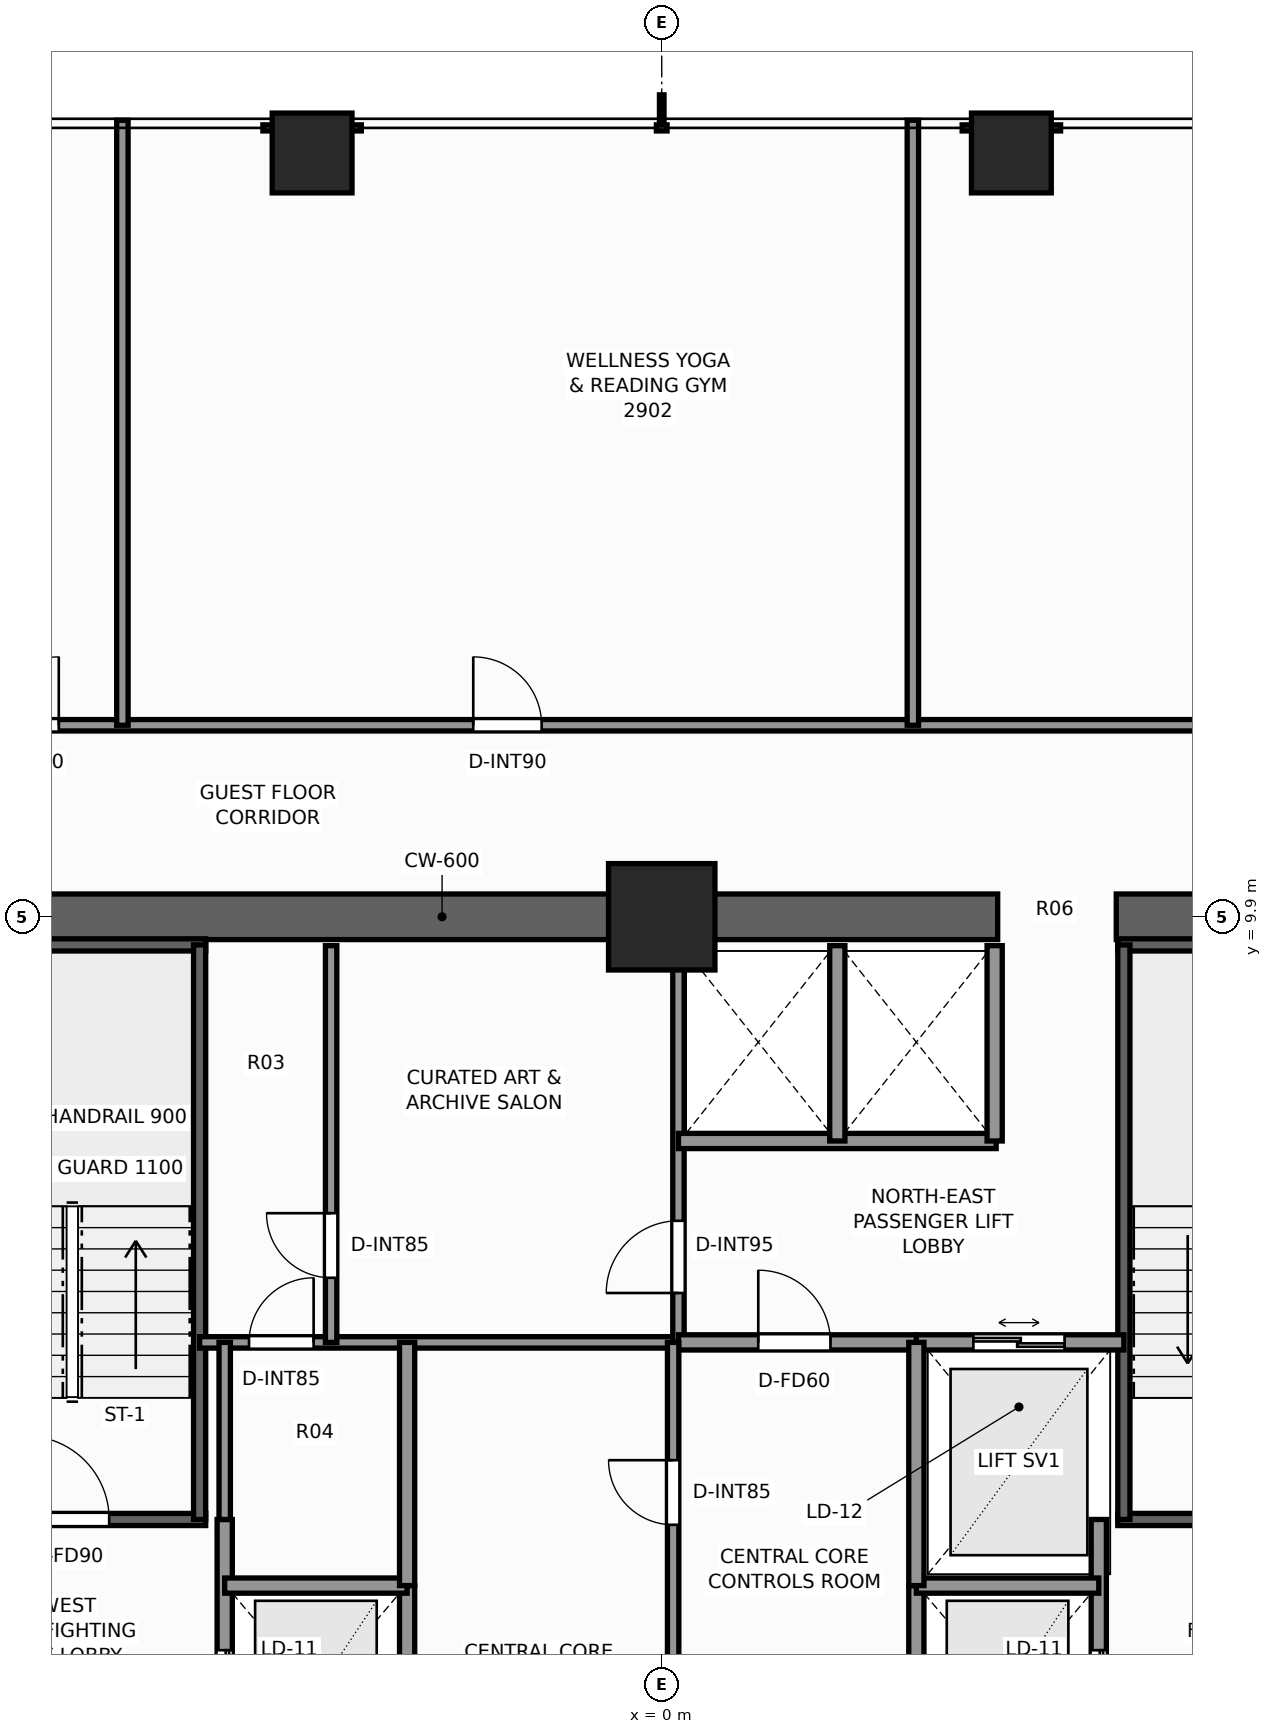
"""IFC4 building model, lengths in metres.
Left out: names, types, materials, properties, quantities, classifications, styles, units other than length and angle.
Written with IfcOpenShell. Run it as: python <this file> out.ifc"""

import sys

from ifc_helpers import new_model, si_unit, direction, frame, frame_2d, origin, origin_2d, place, context, subcontext, project, spatial, rectangle, extrude, element, fill, save


model = new_model("IFC4")
c1 = context("Model", 3, precision=1e-05, world=origin(), true_north=direction((0.0, 1.0)))
c2 = subcontext(c1, "Body", "Model", "MODEL_VIEW")
j1 = project(units=[si_unit("LENGTHUNIT", "METRE"), si_unit("PLANEANGLEUNIT", "RADIAN")], contexts=[c1])
p1 = place(None, origin())
s1 = spatial("IfcSite", under=j1, at=p1, CompositionType="ELEMENT")
p2 = place(p1, origin())
s2 = spatial("IfcBuilding", under=s1, at=p2, CompositionType="ELEMENT")
p3 = place(p2, frame((0.0, 0.0, 101.9)))
s3 = spatial("IfcBuildingStorey", under=s2, at=p3, CompositionType="ELEMENT", Elevation=101.9)
p4 = place(p3, frame((-10.2, 9.9, 0.0), z_axis=(0.0, 0.0, 1.0), x_axis=(1.0, 0.0, 0.0)))
e1 = element("IfcWall", 1, at=p4, inside=s3, PredefinedType="SHEAR", context=c2, shape_type="SweptSolid", body=[
    extrude(rectangle(XDim=14.62, YDim=0.6, at=frame_2d((7.31, 0.0))), origin(), (0.0, 0.0, 1.0), 3.3),
])
p5 = place(p3, frame((5.98, 9.9, 0.0), z_axis=(0.0, 0.0, 1.0), x_axis=(1.0, 0.0, 0.0)))
e2 = element("IfcWall", 2, at=p5, inside=s3, PredefinedType="SHEAR", context=c2, shape_type="SweptSolid", body=[
    extrude(rectangle(XDim=4.22, YDim=0.6, at=frame_2d((2.11, 0.0))), origin(), (0.0, 0.0, 1.0), 3.3),
])
p6 = place(p3, frame((0.0, 9.9, 0.0), z_axis=(0.0, 0.0, 1.0), x_axis=(1.0, 0.0, 0.0)))
e3 = element("IfcColumn", 3, at=p6, inside=s3, PredefinedType="COLUMN", context=c2, shape_type="SweptSolid", body=[
    extrude(rectangle(XDim=1.4, YDim=1.4, at=origin_2d()), origin(), (0.0, 0.0, 1.0), 3.3),
])
for number, where, z_axis, x_axis in (
    (4, (-4.6, 19.95, 0.0), (0.0, 0.0, 1.0), (1.0, 0.0, 0.0)),
    (5, (4.6, 19.95, 0.0), (0.0, 0.0, 1.0), (1.0, 0.0, 0.0)),
):
    element("IfcColumn", number, at=place(p3, frame(where, z_axis=z_axis, x_axis=x_axis)), inside=s3, PredefinedType="COLUMN", context=c2, shape_type="SweptSolid", body=[
        extrude(rectangle(XDim=1.05, YDim=1.05, at=origin_2d()), origin(), (0.0, 0.0, 1.0), 3.3),
    ])
p7 = place(p3, frame((-9.52, 1.97, 0.0), z_axis=(0.0, 0.0, 1.0), x_axis=(1.0, 0.0, 0.0)))
e6 = element("IfcWall", 6, at=p7, inside=s3, PredefinedType="SHEAR", context=c2, shape_type="SweptSolid", body=[
    extrude(rectangle(XDim=3.52, YDim=0.16, at=frame_2d((1.76, 0.0))), origin(), (0.0, 0.0, 1.0), 3.3),
])
p8 = place(p7, frame((1.15, 0.0, 0.0)))
e7 = element("IfcOpeningElement", 7, at=p8, cuts=e6, PredefinedType="OPENING", context=c2, shape_type="SweptSolid", body=[
    extrude(rectangle(XDim=1.1, YDim=2.2, at=frame_2d((0.55, 1.1))), frame((0.0, 0.09, 0.0), z_axis=(0.0, -1.0, 0.0), x_axis=(1.0, 0.0, 0.0)), (0.0, 0.0, 1.0), 0.18),
])
p9 = place(p3, frame((-9.52, 9.53, 0.0), z_axis=(0.0, 0.0, 1.0), x_axis=(1.0, 0.0, 0.0)))
e8 = element("IfcWall", 8, at=p9, inside=s3, PredefinedType="SHEAR", context=c2, shape_type="SweptSolid", body=[
    extrude(rectangle(XDim=3.52, YDim=0.16, at=frame_2d((1.76, 0.0))), origin(), (0.0, 0.0, 1.0), 3.3),
])
p10 = place(p3, frame((-6.08, 1.97, 0.0), z_axis=(0.0, 0.0, 1.0), x_axis=(0.0, 1.0, 0.0)))
e9 = element("IfcWall", 9, at=p10, inside=s3, PredefinedType="SHEAR", context=c2, shape_type="SweptSolid", body=[
    extrude(rectangle(XDim=7.56, YDim=0.16, at=frame_2d((3.78, 0.0))), origin(), (0.0, 0.0, 1.0), 3.3),
])
p11 = place(p3, frame((6.0, 1.97, 0.0), z_axis=(0.0, 0.0, 1.0), x_axis=(1.0, 0.0, 0.0)))
e10 = element("IfcWall", 10, at=p11, inside=s3, PredefinedType="SHEAR", context=c2, shape_type="SweptSolid", body=[
    extrude(rectangle(XDim=3.52, YDim=0.16, at=frame_2d((1.76, 0.0))), origin(), (0.0, 0.0, 1.0), 3.3),
])
p12 = place(p11, frame((1.15, 0.0, 0.0)))
e11 = element("IfcOpeningElement", 11, at=p12, cuts=e10, PredefinedType="OPENING", context=c2, shape_type="SweptSolid", body=[
    extrude(rectangle(XDim=1.1, YDim=2.2, at=frame_2d((0.55, 1.1))), frame((0.0, 0.09, 0.0), z_axis=(0.0, -1.0, 0.0), x_axis=(1.0, 0.0, 0.0)), (0.0, 0.0, 1.0), 0.18),
])
p13 = place(p3, frame((6.0, 9.53, 0.0), z_axis=(0.0, 0.0, 1.0), x_axis=(1.0, 0.0, 0.0)))
e12 = element("IfcWall", 12, at=p13, inside=s3, PredefinedType="SHEAR", context=c2, shape_type="SweptSolid", body=[
    extrude(rectangle(XDim=3.52, YDim=0.16, at=frame_2d((1.76, 0.0))), origin(), (0.0, 0.0, 1.0), 3.3),
])
p14 = place(p3, frame((6.08, 1.97, 0.0), z_axis=(0.0, 0.0, 1.0), x_axis=(0.0, 1.0, 0.0)))
e13 = element("IfcWall", 13, at=p14, inside=s3, PredefinedType="SHEAR", context=c2, shape_type="SweptSolid", body=[
    extrude(rectangle(XDim=7.56, YDim=0.16, at=frame_2d((3.78, 0.0))), origin(), (0.0, 0.0, 1.0), 3.3),
])
p15 = place(p3, frame((-5.75, -3.6, 0.0), z_axis=(0.0, 0.0, 1.0), x_axis=(0.0, 1.0, 0.0)))
e14 = element("IfcWall", 14, at=p15, inside=s3, PredefinedType="SOLIDWALL", context=c2, shape_type="SweptSolid", body=[
    extrude(rectangle(XDim=5.57, YDim=0.2, at=frame_2d((2.785, 0.0))), origin(), (0.0, 0.0, 1.0), 3.08),
])
p16 = place(p15, frame((2.75, 0.0, 0.0)))
e15 = element("IfcOpeningElement", 15, at=p16, cuts=e14, PredefinedType="OPENING", context=c2, shape_type="SweptSolid", body=[
    extrude(rectangle(XDim=1.1, YDim=2.2, at=frame_2d((0.55, 1.1))), frame((0.0, 0.11, 0.0), z_axis=(0.0, -1.0, 0.0), x_axis=(1.0, 0.0, 0.0)), (0.0, 0.0, 1.0), 0.22),
])
p17 = place(p3, frame((-3.35, -1.7, 0.0), z_axis=(0.0, 0.0, 1.0), x_axis=(0.0, 1.0, 0.0)))
e16 = element("IfcWall", 16, at=p17, inside=s3, PredefinedType="SOLIDWALL", context=c2, shape_type="SweptSolid", body=[
    extrude(rectangle(XDim=2.8, YDim=0.2, at=frame_2d((1.4, 0.0))), origin(), (0.0, 0.0, 1.0), 3.08),
])
p18 = place(p3, frame((-5.75, 1.1, 0.0), z_axis=(0.0, 0.0, 1.0), x_axis=(1.0, 0.0, 0.0)))
e17 = element("IfcWall", 17, at=p18, inside=s3, PredefinedType="SOLIDWALL", context=c2, shape_type="SweptSolid", body=[
    extrude(rectangle(XDim=2.4, YDim=0.2, at=frame_2d((1.2, 0.0))), origin(), (0.0, 0.0, 1.0), 3.08),
])
p19 = place(p3, frame((5.75, -3.6, 0.0), z_axis=(0.0, 0.0, 1.0), x_axis=(0.0, 1.0, 0.0)))
e18 = element("IfcWall", 18, at=p19, inside=s3, PredefinedType="SOLIDWALL", context=c2, shape_type="SweptSolid", body=[
    extrude(rectangle(XDim=5.57, YDim=0.2, at=frame_2d((2.785, 0.0))), origin(), (0.0, 0.0, 1.0), 3.08),
])
p20 = place(p19, frame((2.75, 0.0, 0.0)))
e19 = element("IfcOpeningElement", 19, at=p20, cuts=e18, PredefinedType="OPENING", context=c2, shape_type="SweptSolid", body=[
    extrude(rectangle(XDim=1.1, YDim=2.2, at=frame_2d((0.55, 1.1))), frame((0.0, 0.11, 0.0), z_axis=(0.0, -1.0, 0.0), x_axis=(1.0, 0.0, 0.0)), (0.0, 0.0, 1.0), 0.22),
])
p21 = place(p3, frame((3.35, -1.7, 0.0), z_axis=(0.0, 0.0, 1.0), x_axis=(0.0, 1.0, 0.0)))
e20 = element("IfcWall", 20, at=p21, inside=s3, PredefinedType="SOLIDWALL", context=c2, shape_type="SweptSolid", body=[
    extrude(rectangle(XDim=2.8, YDim=0.2, at=frame_2d((1.4, 0.0))), origin(), (0.0, 0.0, 1.0), 3.08),
])
p22 = place(p3, frame((3.35, 1.1, 0.0), z_axis=(0.0, 0.0, 1.0), x_axis=(1.0, 0.0, 0.0)))
e21 = element("IfcWall", 21, at=p22, inside=s3, PredefinedType="SOLIDWALL", context=c2, shape_type="SweptSolid", body=[
    extrude(rectangle(XDim=2.4, YDim=0.2, at=frame_2d((1.2, 0.0))), origin(), (0.0, 0.0, 1.0), 3.08),
])
p23 = place(p3, frame((3.35, 4.3, 0.0), z_axis=(0.0, 0.0, 1.0), x_axis=(1.0, 0.0, 0.0)))
e22 = element("IfcWall", 22, at=p23, inside=s3, PredefinedType="SOLIDWALL", context=c2, shape_type="SweptSolid", body=[
    extrude(rectangle(XDim=2.73, YDim=0.2, at=frame_2d((1.365, 0.0))), origin(), (0.0, 0.0, 1.0), 3.08),
])
p24 = place(p23, frame((0.75, 0.0, 0.0)))
e23 = element("IfcOpeningElement", 23, at=p24, cuts=e22, PredefinedType="OPENING", context=c2, shape_type="SweptSolid", body=[
    extrude(rectangle(XDim=1.2, YDim=2.25, at=frame_2d((0.6, 1.125))), frame((0.0, 0.11, 0.0), z_axis=(0.0, -1.0, 0.0), x_axis=(1.0, 0.0, 0.0)), (0.0, 0.0, 1.0), 0.22),
])
p25 = place(p3, frame((-6.08, 4.3, 0.0), z_axis=(0.0, 0.0, 1.0), x_axis=(1.0, 0.0, 0.0)))
e24 = element("IfcWall", 24, at=p25, inside=s3, PredefinedType="PARTITIONING", context=c2, shape_type="SweptSolid", body=[
    extrude(rectangle(XDim=6.3, YDim=0.15, at=frame_2d((3.15, 0.0))), origin(), (0.0, 0.0, 1.0), 3.08),
])
p26 = place(p25, frame((0.65, 0.0, 0.0)))
e25 = element("IfcOpeningElement", 25, at=p26, cuts=e24, PredefinedType="OPENING", context=c2, shape_type="SweptSolid", body=[
    extrude(rectangle(XDim=0.85, YDim=2.03, at=frame_2d((0.425, 1.015))), frame((0.0, 0.085, 0.0), z_axis=(0.0, -1.0, 0.0), x_axis=(1.0, 0.0, 0.0)), (0.0, 0.0, 1.0), 0.17),
])
p27 = place(p3, frame((0.22, 4.3, 0.0), z_axis=(0.0, 0.0, 1.0), x_axis=(0.0, 1.0, 0.0)))
e26 = element("IfcWall", 26, at=p27, inside=s3, PredefinedType="PARTITIONING", context=c2, shape_type="SweptSolid", body=[
    extrude(rectangle(XDim=5.22, YDim=0.15, at=frame_2d((2.61, 0.0))), origin(), (0.0, 0.0, 1.0), 3.08),
])
p28 = place(p27, frame((0.65, 0.0, 0.0)))
e27 = element("IfcOpeningElement", 27, at=p28, cuts=e26, PredefinedType="OPENING", context=c2, shape_type="SweptSolid", body=[
    extrude(rectangle(XDim=0.95, YDim=2.06, at=frame_2d((0.475, 1.03))), frame((0.0, 0.085, 0.0), z_axis=(0.0, -1.0, 0.0), x_axis=(1.0, 0.0, 0.0)), (0.0, 0.0, 1.0), 0.17),
])
p29 = place(p3, frame((-4.35, 4.3, 0.0), z_axis=(0.0, 0.0, 1.0), x_axis=(0.0, 1.0, 0.0)))
e28 = element("IfcWall", 28, at=p29, inside=s3, PredefinedType="PARTITIONING", context=c2, shape_type="SweptSolid", body=[
    extrude(rectangle(XDim=5.22, YDim=0.15, at=frame_2d((2.61, 0.0))), origin(), (0.0, 0.0, 1.0), 3.08),
])
p30 = place(p29, frame((0.85, 0.0, 0.0)))
e29 = element("IfcOpeningElement", 29, at=p30, cuts=e28, PredefinedType="OPENING", context=c2, shape_type="SweptSolid", body=[
    extrude(rectangle(XDim=0.85, YDim=2.03, at=frame_2d((0.425, 1.015))), frame((0.0, 0.085, 0.0), z_axis=(0.0, -1.0, 0.0), x_axis=(1.0, 0.0, 0.0)), (0.0, 0.0, 1.0), 0.17),
])
p31 = place(p3, frame((0.22, 6.95, 0.0), z_axis=(0.0, 0.0, 1.0), x_axis=(1.0, 0.0, 0.0)))
e30 = element("IfcWall", 30, at=p31, inside=s3, PredefinedType="SOLIDWALL", context=c2, shape_type="SweptSolid", body=[
    extrude(rectangle(XDim=4.18, YDim=0.2, at=frame_2d((2.09, 0.0))), origin(), (0.0, 0.0, 1.0), 3.08),
])
for number, where, z_axis, x_axis in (
    (31, (4.38, 6.95, 0.0), (0.0, 0.0, 1.0), (0.0, 1.0, 0.0)),
    (32, (2.31, 6.95, 0.0), (0.0, 0.0, 1.0), (0.0, 1.0, 0.0)),
):
    element("IfcWall", number, at=place(p3, frame(where, z_axis=z_axis, x_axis=x_axis)), inside=s3, PredefinedType="SOLIDWALL", context=c2, shape_type="SweptSolid", body=[
        extrude(rectangle(XDim=2.57, YDim=0.2, at=frame_2d((1.285, 0.0))), origin(), (0.0, 0.0, 1.0), 3.08),
    ])
p32 = place(p3, frame((0.22, 4.3, 0.0), z_axis=(0.0, 0.0, 1.0), x_axis=(1.0, 0.0, 0.0)))
e33 = element("IfcWall", 33, at=p32, inside=s3, PredefinedType="SOLIDWALL", context=c2, shape_type="SweptSolid", body=[
    extrude(rectangle(XDim=3.13, YDim=0.2, at=frame_2d((1.565, 0.0))), origin(), (0.0, 0.0, 1.0), 3.08),
])
p33 = place(p32, frame((1.05, 0.0, 0.0)))
e34 = element("IfcOpeningElement", 34, at=p33, cuts=e33, PredefinedType="OPENING", context=c2, shape_type="SweptSolid", body=[
    extrude(rectangle(XDim=0.95, YDim=2.06, at=frame_2d((0.475, 1.03))), frame((0.0, 0.11, 0.0), z_axis=(0.0, -1.0, 0.0), x_axis=(1.0, 0.0, 0.0)), (0.0, 0.0, 1.0), 0.22),
])
for number, where, z_axis, x_axis in (
    (35, (-3.35, 1.1, 0.0), (0.0, 0.0, 1.0), (0.0, 1.0, 0.0)),
    (36, (3.35, 1.1, 0.0), (0.0, 0.0, 1.0), (0.0, 1.0, 0.0)),
):
    element("IfcWall", number, at=place(p3, frame(where, z_axis=z_axis, x_axis=x_axis)), inside=s3, PredefinedType="SOLIDWALL", context=c2, shape_type="SweptSolid", body=[
        extrude(rectangle(XDim=3.2, YDim=0.2, at=frame_2d((1.6, 0.0))), origin(), (0.0, 0.0, 1.0), 3.08),
    ])
p34 = place(p3, frame((0.15, -1.7, 0.0), z_axis=(0.0, 0.0, 1.0), x_axis=(0.0, 1.0, 0.0)))
e37 = element("IfcWall", 37, at=p34, inside=s3, PredefinedType="PARTITIONING", context=c2, shape_type="SweptSolid", body=[
    extrude(rectangle(XDim=6.0, YDim=0.15, at=frame_2d((3.0, 0.0))), origin(), (0.0, 0.0, 1.0), 3.08),
])
p35 = place(p34, frame((3.6, 0.0, 0.0)))
e38 = element("IfcOpeningElement", 38, at=p35, cuts=e37, PredefinedType="OPENING", context=c2, shape_type="SweptSolid", body=[
    extrude(rectangle(XDim=0.85, YDim=2.03, at=frame_2d((0.425, 1.015))), frame((0.0, 0.085, 0.0), z_axis=(0.0, -1.0, 0.0), x_axis=(1.0, 0.0, 0.0)), (0.0, 0.0, 1.0), 0.17),
])
p36 = place(p3, frame((-5.75, 1.97, 0.0), z_axis=(0.0, 0.0, 1.0), x_axis=(0.0, 1.0, 0.0)))
e39 = element("IfcWall", 39, at=p36, inside=s3, PredefinedType="PARTITIONING", context=c2, shape_type="SweptSolid", body=[
    extrude(rectangle(XDim=2.33, YDim=0.15, at=frame_2d((1.165, 0.0))), origin(), (0.0, 0.0, 1.0), 3.08),
])
p37 = place(p3, frame((-12.26, 12.42, 0.0), z_axis=(0.0, 0.0, 1.0), x_axis=(1.0, 0.0, 0.0)))
e40 = element("IfcWall", 40, at=p37, inside=s3, PredefinedType="PARTITIONING", context=c2, shape_type="SweptSolid", body=[
    extrude(rectangle(XDim=24.52, YDim=0.15, at=frame_2d((12.26, 0.0))), origin(), (0.0, 0.0, 1.0), 2.292),
])
p38 = place(p37, frame((3.427, 0.0, 0.0)))
e41 = element("IfcOpeningElement", 41, at=p38, cuts=e40, PredefinedType="OPENING", context=c2, shape_type="SweptSolid", body=[
    extrude(rectangle(XDim=0.9, YDim=2.06, at=frame_2d((0.45, 1.03))), frame((0.0, 0.085, 0.0), z_axis=(0.0, -1.0, 0.0), x_axis=(1.0, 0.0, 0.0)), (0.0, 0.0, 1.0), 0.17),
])
p39 = place(p37, frame((9.78, 0.0, 0.0)))
e42 = element("IfcOpeningElement", 42, at=p39, cuts=e40, PredefinedType="OPENING", context=c2, shape_type="SweptSolid", body=[
    extrude(rectangle(XDim=0.9, YDim=2.06, at=frame_2d((0.45, 1.03))), frame((0.0, 0.085, 0.0), z_axis=(0.0, -1.0, 0.0), x_axis=(1.0, 0.0, 0.0)), (0.0, 0.0, 1.0), 0.17),
])
p40 = place(p37, frame((19.345, 0.0, 0.0)))
e43 = element("IfcOpeningElement", 43, at=p40, cuts=e40, PredefinedType="OPENING", context=c2, shape_type="SweptSolid", body=[
    extrude(rectangle(XDim=0.9, YDim=2.06, at=frame_2d((0.45, 1.03))), frame((0.0, 0.085, 0.0), z_axis=(0.0, -1.0, 0.0), x_axis=(1.0, 0.0, 0.0)), (0.0, 0.0, 1.0), 0.17),
])
p41 = place(p3, frame((-7.096, 12.42, 0.0), z_axis=(0.0, 0.0, 1.0), x_axis=(0.0, 1.0, 0.0)))
e44 = element("IfcWall", 44, at=p41, inside=s3, PredefinedType="PARTITIONING", context=c2, shape_type="SweptSolid", body=[
    extrude(rectangle(XDim=7.96, YDim=0.15, at=frame_2d((3.98, 0.0))), origin(), (0.0, 0.0, 1.0), 2.449),
])
p42 = place(p3, frame((3.304, 12.42, 0.0), z_axis=(0.0, 0.0, 1.0), x_axis=(0.0, 1.0, 0.0)))
e45 = element("IfcWall", 45, at=p42, inside=s3, PredefinedType="PARTITIONING", context=c2, shape_type="SweptSolid", body=[
    extrude(rectangle(XDim=7.96, YDim=0.15, at=frame_2d((3.98, 0.0))), origin(), (0.0, 0.0, 1.0), 2.369),
])
p43 = place(p8, origin())
e46 = element("IfcDoor", 46, at=p43, inside=s3, OperationType="SINGLE_SWING_LEFT", PredefinedType="DOOR", context=c2, shape_type="SweptSolid", body=[
    extrude(rectangle(XDim=1.1, YDim=2.2, at=frame_2d((0.55, 1.1))), frame((0.0, 0.025, 0.0), z_axis=(0.0, -1.0, 0.0), x_axis=(1.0, 0.0, 0.0)), (0.0, 0.0, 1.0), 0.05),
])
fill(e7, e46)
p44 = place(p16, origin())
e47 = element("IfcDoor", 47, at=p44, inside=s3, OperationType="DOUBLE_DOOR_SLIDING", PredefinedType="DOOR", context=c2, shape_type="SweptSolid", body=[
    extrude(rectangle(XDim=1.1, YDim=2.2, at=frame_2d((0.55, 1.1))), frame((0.0, 0.025, 0.0), z_axis=(0.0, -1.0, 0.0), x_axis=(1.0, 0.0, 0.0)), (0.0, 0.0, 1.0), 0.05),
])
fill(e15, e47)
p45 = place(p20, origin())
e48 = element("IfcDoor", 48, at=p45, inside=s3, OperationType="DOUBLE_DOOR_SLIDING", PredefinedType="DOOR", context=c2, shape_type="SweptSolid", body=[
    extrude(rectangle(XDim=1.1, YDim=2.2, at=frame_2d((0.55, 1.1))), frame((0.0, 0.025, 0.0), z_axis=(0.0, -1.0, 0.0), x_axis=(1.0, 0.0, 0.0)), (0.0, 0.0, 1.0), 0.05),
])
fill(e19, e48)
p46 = place(p24, origin())
e49 = element("IfcDoor", 49, at=p46, inside=s3, OperationType="DOUBLE_DOOR_SLIDING", PredefinedType="DOOR", context=c2, shape_type="SweptSolid", body=[
    extrude(rectangle(XDim=1.2, YDim=2.25, at=frame_2d((0.6, 1.125))), frame((0.0, 0.025, 0.0), z_axis=(0.0, -1.0, 0.0), x_axis=(1.0, 0.0, 0.0)), (0.0, 0.0, 1.0), 0.05),
])
fill(e23, e49)
p47 = place(p28, origin())
e50 = element("IfcDoor", 50, at=p47, inside=s3, OperationType="SINGLE_SWING_LEFT", PredefinedType="DOOR", context=c2, shape_type="SweptSolid", body=[
    extrude(rectangle(XDim=0.95, YDim=2.06, at=frame_2d((0.475, 1.03))), frame((0.0, 0.025, 0.0), z_axis=(0.0, -1.0, 0.0), x_axis=(1.0, 0.0, 0.0)), (0.0, 0.0, 1.0), 0.05),
])
fill(e27, e50)
p48 = place(p30, origin())
e51 = element("IfcDoor", 51, at=p48, inside=s3, OperationType="SINGLE_SWING_RIGHT", PredefinedType="DOOR", context=c2, shape_type="SweptSolid", body=[
    extrude(rectangle(XDim=0.85, YDim=2.03, at=frame_2d((0.425, 1.015))), frame((0.0, 0.025, 0.0), z_axis=(0.0, -1.0, 0.0), x_axis=(1.0, 0.0, 0.0)), (0.0, 0.0, 1.0), 0.05),
])
fill(e29, e51)
p49 = place(p33, origin())
e52 = element("IfcDoor", 52, at=p49, inside=s3, OperationType="SINGLE_SWING_LEFT", PredefinedType="DOOR", context=c2, shape_type="SweptSolid", body=[
    extrude(rectangle(XDim=0.95, YDim=2.06, at=frame_2d((0.475, 1.03))), frame((0.0, 0.025, 0.0), z_axis=(0.0, -1.0, 0.0), x_axis=(1.0, 0.0, 0.0)), (0.0, 0.0, 1.0), 0.05),
])
fill(e34, e52)
p50 = place(p35, origin())
e53 = element("IfcDoor", 53, at=p50, inside=s3, OperationType="SINGLE_SWING_RIGHT", PredefinedType="DOOR", context=c2, shape_type="SweptSolid", body=[
    extrude(rectangle(XDim=0.85, YDim=2.03, at=frame_2d((0.425, 1.015))), frame((0.0, 0.025, 0.0), z_axis=(0.0, -1.0, 0.0), x_axis=(1.0, 0.0, 0.0)), (0.0, 0.0, 1.0), 0.05),
])
fill(e38, e53)
p51 = place(p26, origin())
e54 = element("IfcDoor", 54, at=p51, inside=s3, OperationType="SINGLE_SWING_RIGHT", PredefinedType="DOOR", context=c2, shape_type="SweptSolid", body=[
    extrude(rectangle(XDim=0.85, YDim=2.03, at=frame_2d((0.425, 1.015))), frame((0.0, 0.025, 0.0), z_axis=(0.0, -1.0, 0.0), x_axis=(1.0, 0.0, 0.0)), (0.0, 0.0, 1.0), 0.05),
])
fill(e25, e54)
p52 = place(p38, origin())
e55 = element("IfcDoor", 55, at=p52, inside=s3, OperationType="SINGLE_SWING_RIGHT", PredefinedType="DOOR", context=c2, shape_type="SweptSolid", body=[
    extrude(rectangle(XDim=0.9, YDim=2.06, at=frame_2d((0.45, 1.03))), frame((0.0, 0.025, 0.0), z_axis=(0.0, -1.0, 0.0), x_axis=(1.0, 0.0, 0.0)), (0.0, 0.0, 1.0), 0.05),
])
fill(e41, e55)
p53 = place(p39, origin())
e56 = element("IfcDoor", 56, at=p53, inside=s3, OperationType="SINGLE_SWING_LEFT", PredefinedType="DOOR", context=c2, shape_type="SweptSolid", body=[
    extrude(rectangle(XDim=0.9, YDim=2.06, at=frame_2d((0.45, 1.03))), frame((0.0, 0.025, 0.0), z_axis=(0.0, -1.0, 0.0), x_axis=(1.0, 0.0, 0.0)), (0.0, 0.0, 1.0), 0.05),
])
fill(e42, e56)
save(model, sys.argv[1])
